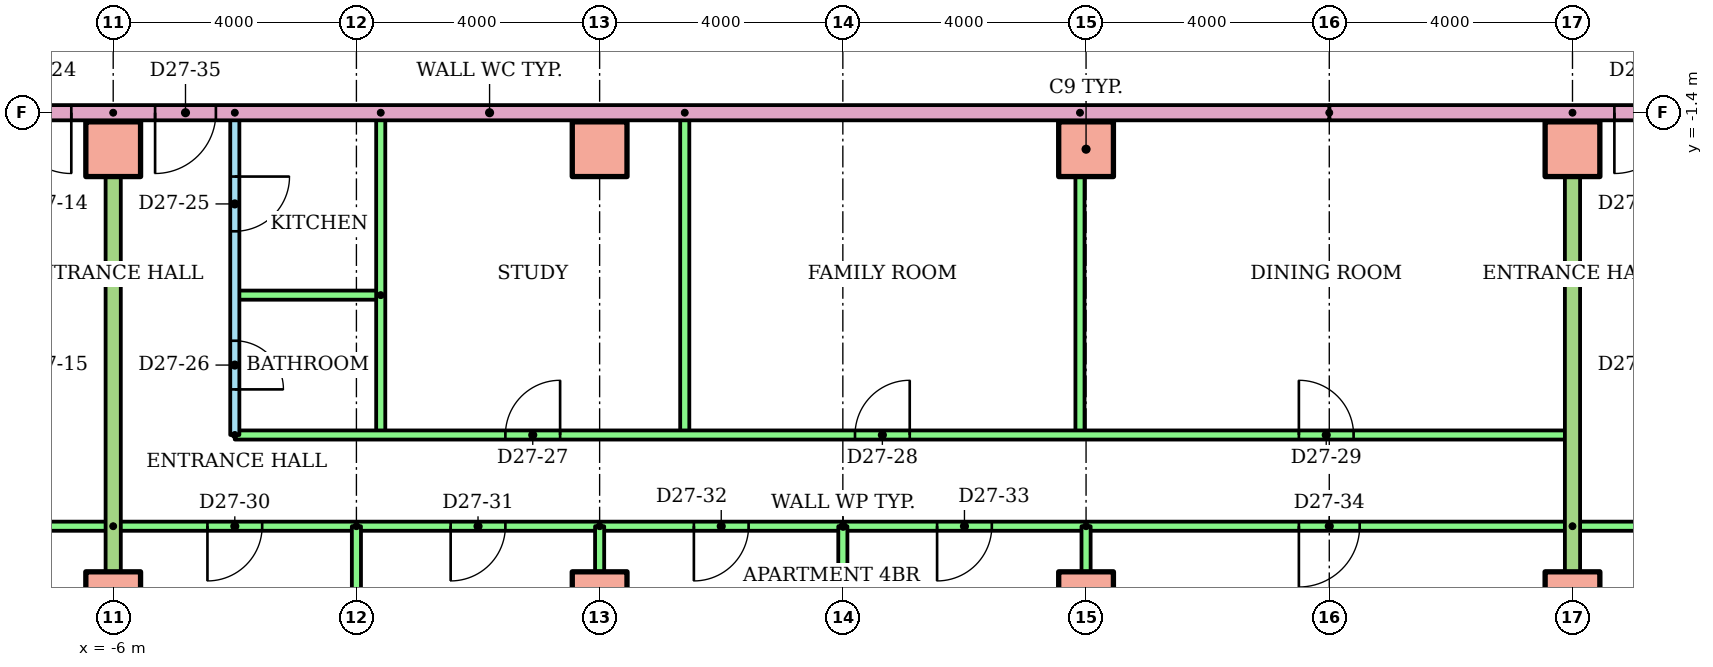
"""IFC4 building model, lengths in metres.
Left out: names, types, materials, properties, quantities, classifications, styles, units other than length and angle.
Written with IfcOpenShell. Run it as: python <this file> out.ifc"""

import sys

from ifc_helpers import new_model, si_unit, direction, frame, frame_2d, origin, origin_2d, place, context, subcontext, project, spatial, rectangle, extrude, element, fill, save


model = new_model("IFC4")
c1 = context("Model", 3, precision=1e-05, world=origin(), true_north=direction((0.0, 1.0)))
c2 = subcontext(c1, "Body", "Model", "MODEL_VIEW")
j1 = project(units=[si_unit("LENGTHUNIT", "METRE"), si_unit("PLANEANGLEUNIT", "RADIAN")], contexts=[c1])
p1 = place(None, origin())
s1 = spatial("IfcSite", under=j1, at=p1, CompositionType="ELEMENT")
p2 = place(p1, origin())
s2 = spatial("IfcBuilding", under=s1, at=p2, CompositionType="ELEMENT")
p3 = place(p2, frame((0.0, 0.0, 103.1)))
s3 = spatial("IfcBuildingStorey", under=s2, at=p3, CompositionType="ELEMENT", Elevation=103.1)
for number, where in (
    (1, (-6.0, -9.4, 0.0)),
    (2, (2.0, -9.4, 0.0)),
    (3, (10.0, -9.4, 0.0)),
    (4, (18.0, -9.4, 0.0)),
    (5, (-6.0, -2.0, 0.0)),
    (6, (2.0, -2.0, 0.0)),
    (7, (10.0, -2.0, 0.0)),
    (8, (18.0, -2.0, 0.0)),
):
    element("IfcColumn", number, at=place(p3, frame(where)), inside=s3, PredefinedType="COLUMN", context=c2, shape_type="SweptSolid", body=[
        extrude(rectangle(XDim=0.9, YDim=0.9, at=origin_2d()), origin(), (0.0, 0.0, 1.0), 3.2),
    ])
p4 = place(p3, frame((-6.0, -8.2, 0.0), z_axis=(0.0, 0.0, 1.0), x_axis=(-1.0, 0.0, 0.0)))
e9 = element("IfcWall", 9, at=p4, inside=s3, PredefinedType="PARTITIONING", context=c2, shape_type="SweptSolid", body=[
    extrude(rectangle(XDim=22.61, YDim=0.15, at=frame_2d((11.305, 0.0))), origin(), (0.0, 0.0, 1.0), 2.4),
])
p5 = place(p4, frame((19.7, 0.0, 0.0)))
e10 = element("IfcOpeningElement", 10, at=p5, cuts=e9, PredefinedType="OPENING", context=c2, shape_type="SweptSolid", body=[
    extrude(rectangle(XDim=0.9, YDim=2.1, at=frame_2d((0.45, 1.05))), frame((0.0, 0.085, 0.0), z_axis=(0.0, -1.0, 0.0), x_axis=(1.0, 0.0, 0.0)), (0.0, 0.0, 1.0), 0.17),
])
p6 = place(p4, frame((14.411, 0.0, 0.0)))
e11 = element("IfcOpeningElement", 11, at=p6, cuts=e9, PredefinedType="OPENING", context=c2, shape_type="SweptSolid", body=[
    extrude(rectangle(XDim=0.9, YDim=2.1, at=frame_2d((0.45, 1.05))), frame((0.0, 0.085, 0.0), z_axis=(0.0, -1.0, 0.0), x_axis=(1.0, 0.0, 0.0)), (0.0, 0.0, 1.0), 0.17),
])
p7 = place(p4, frame((9.55, 0.0, 0.0)))
e12 = element("IfcOpeningElement", 12, at=p7, cuts=e9, PredefinedType="OPENING", context=c2, shape_type="SweptSolid", body=[
    extrude(rectangle(XDim=0.9, YDim=2.1, at=frame_2d((0.45, 1.05))), frame((0.0, 0.085, 0.0), z_axis=(0.0, -1.0, 0.0), x_axis=(1.0, 0.0, 0.0)), (0.0, 0.0, 1.0), 0.17),
])
p8 = place(p4, frame((5.55, 0.0, 0.0)))
e13 = element("IfcOpeningElement", 13, at=p8, cuts=e9, PredefinedType="OPENING", context=c2, shape_type="SweptSolid", body=[
    extrude(rectangle(XDim=0.9, YDim=2.1, at=frame_2d((0.45, 1.05))), frame((0.0, 0.085, 0.0), z_axis=(0.0, -1.0, 0.0), x_axis=(1.0, 0.0, 0.0)), (0.0, 0.0, 1.0), 0.17),
])
p9 = place(p4, frame((1.5, 0.0, 0.0)))
e14 = element("IfcOpeningElement", 14, at=p9, cuts=e9, PredefinedType="OPENING", context=c2, shape_type="SweptSolid", body=[
    extrude(rectangle(XDim=1.0, YDim=2.1, at=frame_2d((0.5, 1.05))), frame((0.0, 0.085, 0.0), z_axis=(0.0, -1.0, 0.0), x_axis=(1.0, 0.0, 0.0)), (0.0, 0.0, 1.0), 0.17),
])
p10 = place(p3, frame((-4.0, -1.4, 0.0), z_axis=(0.0, 0.0, 1.0), x_axis=(0.0, -1.0, 0.0)))
e15 = element("IfcWall", 15, at=p10, inside=s3, PredefinedType="PARTITIONING", context=c2, shape_type="SweptSolid", body=[
    extrude(rectangle(XDim=5.3, YDim=0.15, at=frame_2d((2.65, 0.0))), origin(), (0.0, 0.0, 1.0), 2.4),
])
p11 = place(p10, frame((1.05, 0.0, 0.0)))
e16 = element("IfcOpeningElement", 16, at=p11, cuts=e15, PredefinedType="OPENING", context=c2, shape_type="SweptSolid", body=[
    extrude(rectangle(XDim=0.9, YDim=2.1, at=frame_2d((0.45, 1.05))), frame((0.0, 0.085, 0.0), z_axis=(0.0, -1.0, 0.0), x_axis=(1.0, 0.0, 0.0)), (0.0, 0.0, 1.0), 0.17),
])
p12 = place(p10, frame((3.75, 0.0, 0.0)))
e17 = element("IfcOpeningElement", 17, at=p12, cuts=e15, PredefinedType="OPENING", context=c2, shape_type="SweptSolid", body=[
    extrude(rectangle(XDim=0.8, YDim=2.1, at=frame_2d((0.4, 1.05))), frame((0.0, 0.085, 0.0), z_axis=(0.0, -1.0, 0.0), x_axis=(1.0, 0.0, 0.0)), (0.0, 0.0, 1.0), 0.17),
])
p13 = place(p3, frame((-1.6, -4.4, 0.0), z_axis=(0.0, 0.0, 1.0), x_axis=(-1.0, 0.0, 0.0)))
e18 = element("IfcWall", 18, at=p13, inside=s3, PredefinedType="PARTITIONING", context=c2, shape_type="SweptSolid", body=[
    extrude(rectangle(XDim=2.4, YDim=0.15, at=frame_2d((1.2, 0.0))), origin(), (0.0, 0.0, 1.0), 2.4),
])
for number, where, z_axis, x_axis in (
    (19, (-1.6, -1.4, 0.0), (0.0, 0.0, 1.0), (0.0, -1.0, 0.0)),
    (20, (3.4, -1.4, 0.0), (0.0, 0.0, 1.0), (0.0, -1.0, 0.0)),
    (21, (9.9, -1.4, 0.0), (0.0, 0.0, 1.0), (0.0, -1.0, 0.0)),
):
    element("IfcWall", number, at=place(p3, frame(where, z_axis=z_axis, x_axis=x_axis)), inside=s3, PredefinedType="PARTITIONING", context=c2, shape_type="SweptSolid", body=[
        extrude(rectangle(XDim=5.3, YDim=0.15, at=frame_2d((2.65, 0.0))), origin(), (0.0, 0.0, 1.0), 2.4),
    ])
p14 = place(p3, frame((-4.0, -6.7, 0.0)))
e22 = element("IfcWall", 22, at=p14, inside=s3, PredefinedType="PARTITIONING", context=c2, shape_type="SweptSolid", body=[
    extrude(rectangle(XDim=22.0, YDim=0.15, at=frame_2d((11.0, 0.0))), origin(), (0.0, 0.0, 1.0), 2.4),
])
p15 = place(p14, frame((4.45, 0.0, 0.0)))
e23 = element("IfcOpeningElement", 23, at=p15, cuts=e22, PredefinedType="OPENING", context=c2, shape_type="SweptSolid", body=[
    extrude(rectangle(XDim=0.9, YDim=2.1, at=frame_2d((0.45, 1.05))), frame((0.0, 0.085, 0.0), z_axis=(0.0, -1.0, 0.0), x_axis=(1.0, 0.0, 0.0)), (0.0, 0.0, 1.0), 0.17),
])
p16 = place(p14, frame((10.2, 0.0, 0.0)))
e24 = element("IfcOpeningElement", 24, at=p16, cuts=e22, PredefinedType="OPENING", context=c2, shape_type="SweptSolid", body=[
    extrude(rectangle(XDim=0.9, YDim=2.1, at=frame_2d((0.45, 1.05))), frame((0.0, 0.085, 0.0), z_axis=(0.0, -1.0, 0.0), x_axis=(1.0, 0.0, 0.0)), (0.0, 0.0, 1.0), 0.17),
])
p17 = place(p14, frame((17.5, 0.0, 0.0)))
e25 = element("IfcOpeningElement", 25, at=p17, cuts=e22, PredefinedType="OPENING", context=c2, shape_type="SweptSolid", body=[
    extrude(rectangle(XDim=0.9, YDim=2.1, at=frame_2d((0.45, 1.05))), frame((0.0, 0.085, 0.0), z_axis=(0.0, -1.0, 0.0), x_axis=(1.0, 0.0, 0.0)), (0.0, 0.0, 1.0), 0.17),
])
p18 = place(p3, frame((18.0, -8.2, 0.0), z_axis=(0.0, 0.0, 1.0), x_axis=(-1.0, 0.0, 0.0)))
e26 = element("IfcWall", 26, at=p18, inside=s3, PredefinedType="PARTITIONING", context=c2, shape_type="SweptSolid", body=[
    extrude(rectangle(XDim=24.0, YDim=0.15, at=frame_2d((12.0, 0.0))), origin(), (0.0, 0.0, 1.0), 2.4),
])
p19 = place(p18, frame((21.55, 0.0, 0.0)))
e27 = element("IfcOpeningElement", 27, at=p19, cuts=e26, PredefinedType="OPENING", context=c2, shape_type="SweptSolid", body=[
    extrude(rectangle(XDim=0.9, YDim=2.1, at=frame_2d((0.45, 1.05))), frame((0.0, 0.085, 0.0), z_axis=(0.0, -1.0, 0.0), x_axis=(1.0, 0.0, 0.0)), (0.0, 0.0, 1.0), 0.17),
])
p20 = place(p18, frame((17.55, 0.0, 0.0)))
e28 = element("IfcOpeningElement", 28, at=p20, cuts=e26, PredefinedType="OPENING", context=c2, shape_type="SweptSolid", body=[
    extrude(rectangle(XDim=0.9, YDim=2.1, at=frame_2d((0.45, 1.05))), frame((0.0, 0.085, 0.0), z_axis=(0.0, -1.0, 0.0), x_axis=(1.0, 0.0, 0.0)), (0.0, 0.0, 1.0), 0.17),
])
p21 = place(p18, frame((13.55, 0.0, 0.0)))
e29 = element("IfcOpeningElement", 29, at=p21, cuts=e26, PredefinedType="OPENING", context=c2, shape_type="SweptSolid", body=[
    extrude(rectangle(XDim=0.9, YDim=2.1, at=frame_2d((0.45, 1.05))), frame((0.0, 0.085, 0.0), z_axis=(0.0, -1.0, 0.0), x_axis=(1.0, 0.0, 0.0)), (0.0, 0.0, 1.0), 0.17),
])
p22 = place(p18, frame((9.55, 0.0, 0.0)))
e30 = element("IfcOpeningElement", 30, at=p22, cuts=e26, PredefinedType="OPENING", context=c2, shape_type="SweptSolid", body=[
    extrude(rectangle(XDim=0.9, YDim=2.1, at=frame_2d((0.45, 1.05))), frame((0.0, 0.085, 0.0), z_axis=(0.0, -1.0, 0.0), x_axis=(1.0, 0.0, 0.0)), (0.0, 0.0, 1.0), 0.17),
])
p23 = place(p18, frame((3.5, 0.0, 0.0)))
e31 = element("IfcOpeningElement", 31, at=p23, cuts=e26, PredefinedType="OPENING", context=c2, shape_type="SweptSolid", body=[
    extrude(rectangle(XDim=1.0, YDim=2.1, at=frame_2d((0.5, 1.05))), frame((0.0, 0.085, 0.0), z_axis=(0.0, -1.0, 0.0), x_axis=(1.0, 0.0, 0.0)), (0.0, 0.0, 1.0), 0.17),
])
p24 = place(p3, frame((-2.0, -8.2, 0.0), z_axis=(0.0, 0.0, 1.0), x_axis=(0.0, -1.0, 0.0)))
e32 = element("IfcWall", 32, at=p24, inside=s3, PredefinedType="PARTITIONING", context=c2, shape_type="SweptSolid", body=[
    extrude(rectangle(XDim=8.021, YDim=0.15, at=frame_2d((4.01, 0.0))), origin(), (0.0, 0.0, 1.0), 2.4),
])
p25 = place(p3, frame((2.0, -8.2, 0.0), z_axis=(0.0, 0.0, 1.0), x_axis=(0.0, -1.0, 0.0)))
e33 = element("IfcWall", 33, at=p25, inside=s3, PredefinedType="PARTITIONING", context=c2, shape_type="SweptSolid", body=[
    extrude(rectangle(XDim=8.01, YDim=0.15, at=frame_2d((4.005, 0.0))), origin(), (0.0, 0.0, 1.0), 2.4),
])
p26 = place(p3, frame((6.0, -8.2, 0.0), z_axis=(0.0, 0.0, 1.0), x_axis=(0.0, -1.0, 0.0)))
e34 = element("IfcWall", 34, at=p26, inside=s3, PredefinedType="PARTITIONING", context=c2, shape_type="SweptSolid", body=[
    extrude(rectangle(XDim=8.021, YDim=0.15, at=frame_2d((4.01, 0.0))), origin(), (0.0, 0.0, 1.0), 2.4),
])
p27 = place(p3, frame((10.0, -8.2, 0.0), z_axis=(0.0, 0.0, 1.0), x_axis=(0.0, -1.0, 0.0)))
e35 = element("IfcWall", 35, at=p27, inside=s3, PredefinedType="PARTITIONING", context=c2, shape_type="SweptSolid", body=[
    extrude(rectangle(XDim=8.01, YDim=0.15, at=frame_2d((4.005, 0.0))), origin(), (0.0, 0.0, 1.0), 2.4),
])
p28 = place(p3, frame((-6.0, -1.4, 0.0), z_axis=(0.0, 0.0, 1.0), x_axis=(0.0, -1.0, 0.0)))
e36 = element("IfcWall", 36, at=p28, inside=s3, PredefinedType="PARTITIONING", context=c2, shape_type="SweptSolid", body=[
    extrude(rectangle(XDim=14.81, YDim=0.25, at=frame_2d((7.405, 0.0))), origin(), (0.0, 0.0, 1.0), 2.4),
])
p29 = place(p3, frame((40.62, -8.2, 0.0), z_axis=(0.0, 0.0, 1.0), x_axis=(-1.0, 0.0, 0.0)))
e37 = element("IfcWall", 37, at=p29, inside=s3, PredefinedType="PARTITIONING", context=c2, shape_type="SweptSolid", body=[
    extrude(rectangle(XDim=22.62, YDim=0.15, at=frame_2d((11.31, 0.0))), origin(), (0.0, 0.0, 1.0), 2.4),
])
p30 = place(p29, frame((18.12, 0.0, 0.0)))
e38 = element("IfcOpeningElement", 38, at=p30, cuts=e37, PredefinedType="OPENING", context=c2, shape_type="SweptSolid", body=[
    extrude(rectangle(XDim=1.0, YDim=2.1, at=frame_2d((0.5, 1.05))), frame((0.0, 0.085, 0.0), z_axis=(0.0, -1.0, 0.0), x_axis=(1.0, 0.0, 0.0)), (0.0, 0.0, 1.0), 0.17),
])
p31 = place(p29, frame((12.17, 0.0, 0.0)))
e39 = element("IfcOpeningElement", 39, at=p31, cuts=e37, PredefinedType="OPENING", context=c2, shape_type="SweptSolid", body=[
    extrude(rectangle(XDim=0.9, YDim=2.1, at=frame_2d((0.45, 1.05))), frame((0.0, 0.085, 0.0), z_axis=(0.0, -1.0, 0.0), x_axis=(1.0, 0.0, 0.0)), (0.0, 0.0, 1.0), 0.17),
])
p32 = place(p29, frame((8.17, 0.0, 0.0)))
e40 = element("IfcOpeningElement", 40, at=p32, cuts=e37, PredefinedType="OPENING", context=c2, shape_type="SweptSolid", body=[
    extrude(rectangle(XDim=0.9, YDim=2.1, at=frame_2d((0.45, 1.05))), frame((0.0, 0.085, 0.0), z_axis=(0.0, -1.0, 0.0), x_axis=(1.0, 0.0, 0.0)), (0.0, 0.0, 1.0), 0.17),
])
p33 = place(p29, frame((2.97, 0.0, 0.0)))
e41 = element("IfcOpeningElement", 41, at=p33, cuts=e37, PredefinedType="OPENING", context=c2, shape_type="SweptSolid", body=[
    extrude(rectangle(XDim=0.9, YDim=2.1, at=frame_2d((0.45, 1.05))), frame((0.0, 0.085, 0.0), z_axis=(0.0, -1.0, 0.0), x_axis=(1.0, 0.0, 0.0)), (0.0, 0.0, 1.0), 0.17),
])
p34 = place(p3, frame((18.0, -1.4, 0.0), z_axis=(0.0, 0.0, 1.0), x_axis=(0.0, -1.0, 0.0)))
e42 = element("IfcWall", 42, at=p34, inside=s3, PredefinedType="PARTITIONING", context=c2, shape_type="SweptSolid", body=[
    extrude(rectangle(XDim=14.81, YDim=0.25, at=frame_2d((7.405, 0.0))), origin(), (0.0, 0.0, 1.0), 2.4),
])
p35 = place(p3, frame((29.0, -1.4, 0.0), z_axis=(0.0, 0.0, 1.0), x_axis=(-1.0, 0.0, 0.0)))
e43 = element("IfcWall", 43, at=p35, inside=s3, PredefinedType="PARTITIONING", context=c2, shape_type="SweptSolid", body=[
    extrude(rectangle(XDim=15.0, YDim=0.25, at=frame_2d((7.5, 0.0))), origin(), (0.0, 0.0, 1.0), 2.4),
])
p36 = place(p35, frame((9.311, 0.0, 0.0)))
e44 = element("IfcOpeningElement", 44, at=p36, cuts=e43, PredefinedType="OPENING", context=c2, shape_type="SweptSolid", body=[
    extrude(rectangle(XDim=1.0, YDim=2.1, at=frame_2d((0.5, 1.05))), frame((0.0, 0.135, 0.0), z_axis=(0.0, -1.0, 0.0), x_axis=(1.0, 0.0, 0.0)), (0.0, 0.0, 1.0), 0.27),
])
p37 = place(p3, frame((14.0, -1.4, 0.0), z_axis=(0.0, 0.0, 1.0), x_axis=(-1.0, 0.0, 0.0)))
e45 = element("IfcWall", 45, at=p37, inside=s3, PredefinedType="PARTITIONING", context=c2, shape_type="SweptSolid", body=[
    extrude(rectangle(XDim=28.0, YDim=0.25, at=frame_2d((14.0, 0.0))), origin(), (0.0, 0.0, 1.0), 2.4),
])
p38 = place(p37, frame((20.689, 0.0, 0.0)))
e46 = element("IfcOpeningElement", 46, at=p38, cuts=e45, PredefinedType="OPENING", context=c2, shape_type="SweptSolid", body=[
    extrude(rectangle(XDim=1.0, YDim=2.1, at=frame_2d((0.5, 1.05))), frame((0.0, 0.135, 0.0), z_axis=(0.0, -1.0, 0.0), x_axis=(1.0, 0.0, 0.0)), (0.0, 0.0, 1.0), 0.27),
])
p39 = place(p37, frame((18.311, 0.0, 0.0)))
e47 = element("IfcOpeningElement", 47, at=p39, cuts=e45, PredefinedType="OPENING", context=c2, shape_type="SweptSolid", body=[
    extrude(rectangle(XDim=1.0, YDim=2.1, at=frame_2d((0.5, 1.05))), frame((0.0, 0.135, 0.0), z_axis=(0.0, -1.0, 0.0), x_axis=(1.0, 0.0, 0.0)), (0.0, 0.0, 1.0), 0.27),
])
p40 = place(p38, origin())
e48 = element("IfcDoor", 48, at=p40, inside=s3, OperationType="SINGLE_SWING_LEFT", PredefinedType="DOOR", context=c2, shape_type="SweptSolid", body=[
    extrude(rectangle(XDim=1.0, YDim=2.1, at=frame_2d((0.5, 1.05))), frame((0.0, 0.025, 0.0), z_axis=(0.0, -1.0, 0.0), x_axis=(1.0, 0.0, 0.0)), (0.0, 0.0, 1.0), 0.05),
])
fill(e46, e48)
p41 = place(p11, origin())
e49 = element("IfcDoor", 49, at=p41, inside=s3, OperationType="SINGLE_SWING_LEFT", PredefinedType="DOOR", context=c2, shape_type="SweptSolid", body=[
    extrude(rectangle(XDim=0.9, YDim=2.1, at=frame_2d((0.45, 1.05))), frame((0.0, 0.025, 0.0), z_axis=(0.0, -1.0, 0.0), x_axis=(1.0, 0.0, 0.0)), (0.0, 0.0, 1.0), 0.05),
])
fill(e16, e49)
p42 = place(p12, origin())
e50 = element("IfcDoor", 50, at=p42, inside=s3, OperationType="SINGLE_SWING_RIGHT", PredefinedType="DOOR", context=c2, shape_type="SweptSolid", body=[
    extrude(rectangle(XDim=0.8, YDim=2.1, at=frame_2d((0.4, 1.05))), frame((0.0, 0.025, 0.0), z_axis=(0.0, -1.0, 0.0), x_axis=(1.0, 0.0, 0.0)), (0.0, 0.0, 1.0), 0.05),
])
fill(e17, e50)
p43 = place(p15, origin())
e51 = element("IfcDoor", 51, at=p43, inside=s3, OperationType="SINGLE_SWING_RIGHT", PredefinedType="DOOR", context=c2, shape_type="SweptSolid", body=[
    extrude(rectangle(XDim=0.9, YDim=2.1, at=frame_2d((0.45, 1.05))), frame((0.0, 0.025, 0.0), z_axis=(0.0, -1.0, 0.0), x_axis=(1.0, 0.0, 0.0)), (0.0, 0.0, 1.0), 0.05),
])
fill(e23, e51)
p44 = place(p16, origin())
e52 = element("IfcDoor", 52, at=p44, inside=s3, OperationType="SINGLE_SWING_RIGHT", PredefinedType="DOOR", context=c2, shape_type="SweptSolid", body=[
    extrude(rectangle(XDim=0.9, YDim=2.1, at=frame_2d((0.45, 1.05))), frame((0.0, 0.025, 0.0), z_axis=(0.0, -1.0, 0.0), x_axis=(1.0, 0.0, 0.0)), (0.0, 0.0, 1.0), 0.05),
])
fill(e24, e52)
p45 = place(p17, origin())
e53 = element("IfcDoor", 53, at=p45, inside=s3, OperationType="SINGLE_SWING_LEFT", PredefinedType="DOOR", context=c2, shape_type="SweptSolid", body=[
    extrude(rectangle(XDim=0.9, YDim=2.1, at=frame_2d((0.45, 1.05))), frame((0.0, 0.025, 0.0), z_axis=(0.0, -1.0, 0.0), x_axis=(1.0, 0.0, 0.0)), (0.0, 0.0, 1.0), 0.05),
])
fill(e25, e53)
p46 = place(p19, origin())
e54 = element("IfcDoor", 54, at=p46, inside=s3, OperationType="SINGLE_SWING_RIGHT", PredefinedType="DOOR", context=c2, shape_type="SweptSolid", body=[
    extrude(rectangle(XDim=0.9, YDim=2.1, at=frame_2d((0.45, 1.05))), frame((0.0, 0.025, 0.0), z_axis=(0.0, -1.0, 0.0), x_axis=(1.0, 0.0, 0.0)), (0.0, 0.0, 1.0), 0.05),
])
fill(e27, e54)
p47 = place(p20, origin())
e55 = element("IfcDoor", 55, at=p47, inside=s3, OperationType="SINGLE_SWING_RIGHT", PredefinedType="DOOR", context=c2, shape_type="SweptSolid", body=[
    extrude(rectangle(XDim=0.9, YDim=2.1, at=frame_2d((0.45, 1.05))), frame((0.0, 0.025, 0.0), z_axis=(0.0, -1.0, 0.0), x_axis=(1.0, 0.0, 0.0)), (0.0, 0.0, 1.0), 0.05),
])
fill(e28, e55)
p48 = place(p21, origin())
e56 = element("IfcDoor", 56, at=p48, inside=s3, OperationType="SINGLE_SWING_RIGHT", PredefinedType="DOOR", context=c2, shape_type="SweptSolid", body=[
    extrude(rectangle(XDim=0.9, YDim=2.1, at=frame_2d((0.45, 1.05))), frame((0.0, 0.025, 0.0), z_axis=(0.0, -1.0, 0.0), x_axis=(1.0, 0.0, 0.0)), (0.0, 0.0, 1.0), 0.05),
])
fill(e29, e56)
p49 = place(p22, origin())
e57 = element("IfcDoor", 57, at=p49, inside=s3, OperationType="SINGLE_SWING_RIGHT", PredefinedType="DOOR", context=c2, shape_type="SweptSolid", body=[
    extrude(rectangle(XDim=0.9, YDim=2.1, at=frame_2d((0.45, 1.05))), frame((0.0, 0.025, 0.0), z_axis=(0.0, -1.0, 0.0), x_axis=(1.0, 0.0, 0.0)), (0.0, 0.0, 1.0), 0.05),
])
fill(e30, e57)
p50 = place(p23, origin())
e58 = element("IfcDoor", 58, at=p50, inside=s3, OperationType="SINGLE_SWING_RIGHT", PredefinedType="DOOR", context=c2, shape_type="SweptSolid", body=[
    extrude(rectangle(XDim=1.0, YDim=2.1, at=frame_2d((0.5, 1.05))), frame((0.0, 0.025, 0.0), z_axis=(0.0, -1.0, 0.0), x_axis=(1.0, 0.0, 0.0)), (0.0, 0.0, 1.0), 0.05),
])
fill(e31, e58)
p51 = place(p39, origin())
e59 = element("IfcDoor", 59, at=p51, inside=s3, OperationType="SINGLE_SWING_RIGHT", PredefinedType="DOOR", context=c2, shape_type="SweptSolid", body=[
    extrude(rectangle(XDim=1.0, YDim=2.1, at=frame_2d((0.5, 1.05))), frame((0.0, 0.025, 0.0), z_axis=(0.0, -1.0, 0.0), x_axis=(1.0, 0.0, 0.0)), (0.0, 0.0, 1.0), 0.05),
])
fill(e47, e59)
p52 = place(p36, origin())
e60 = element("IfcDoor", 60, at=p52, inside=s3, OperationType="SINGLE_SWING_RIGHT", PredefinedType="DOOR", context=c2, shape_type="SweptSolid", body=[
    extrude(rectangle(XDim=1.0, YDim=2.1, at=frame_2d((0.5, 1.05))), frame((0.0, 0.025, 0.0), z_axis=(0.0, -1.0, 0.0), x_axis=(1.0, 0.0, 0.0)), (0.0, 0.0, 1.0), 0.05),
])
fill(e44, e60)
save(model, sys.argv[1])
